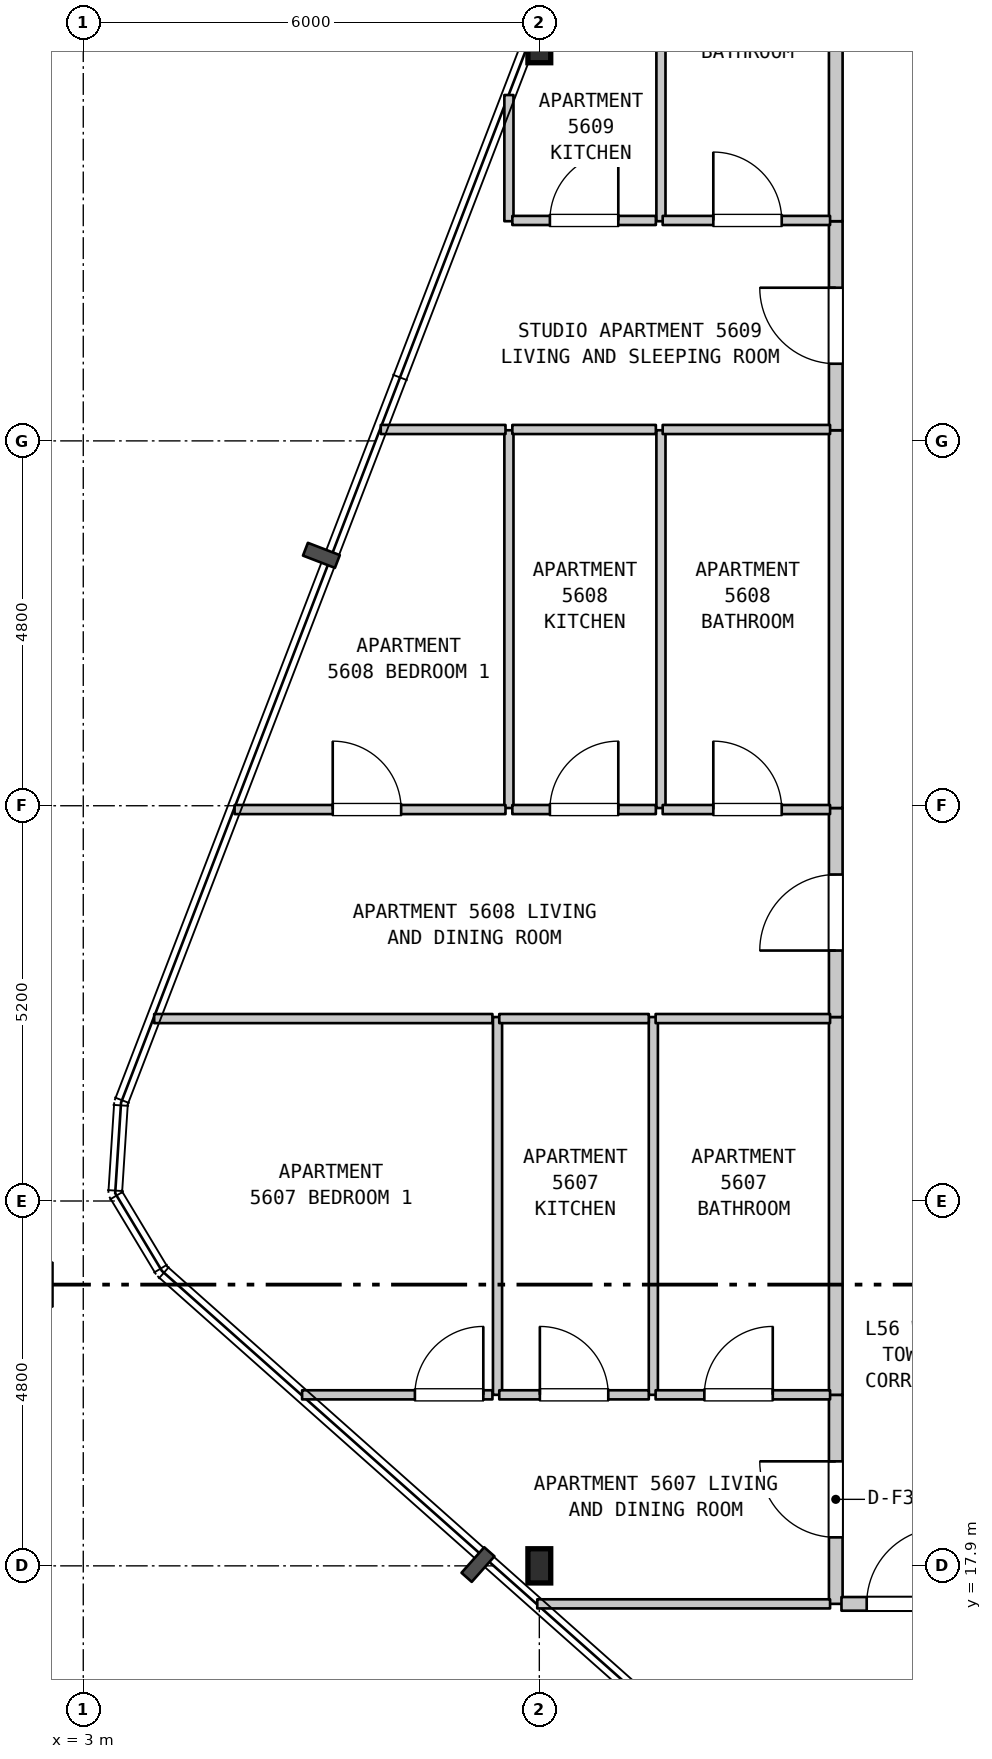
"""IFC4 building model, lengths in metres.
Left out: names, types, materials, properties, quantities, classifications, styles, units other than length and angle.
Written with IfcOpenShell. Run it as: python <this file> out.ifc"""

import sys

from ifc_helpers import new_model, si_unit, direction, frame, frame_2d, origin, origin_2d, place, context, subcontext, project, spatial, rectangle, i_section, extrude, element, fill, save


model = new_model("IFC4")
c1 = context("Model", 3, precision=1e-05, world=origin(), true_north=direction((0.0, 1.0)))
c2 = subcontext(c1, "Body", "Model", "MODEL_VIEW")
j1 = project(units=[si_unit("LENGTHUNIT", "METRE"), si_unit("PLANEANGLEUNIT", "RADIAN")], contexts=[c1])
p1 = place(None, origin())
s1 = spatial("IfcSite", under=j1, at=p1, CompositionType="ELEMENT")
p2 = place(p1, origin())
s2 = spatial("IfcBuilding", under=s1, at=p2, CompositionType="ELEMENT")
p3 = place(p2, frame((0.0, 0.0, 226.5)))
s3 = spatial("IfcBuildingStorey", under=s2, at=p3, CompositionType="ELEMENT", Elevation=226.5)
for number, where, z_axis, x_axis in (
    (1, (9.0, 17.9, 0.0), (0.0, 0.0, 1.0), (1.0, 0.0, 0.0)),
    (2, (9.0, 37.9, 0.0), (0.0, 0.0, 1.0), (1.0, 0.0, 0.0)),
):
    element("IfcColumn", number, at=place(p3, frame(where, z_axis=z_axis, x_axis=x_axis)), inside=s3, PredefinedType="COLUMN", context=c2, shape_type="SweptSolid", body=[
        extrude(i_section(OverallWidth=0.3, OverallDepth=0.45, WebThickness=0.014, FlangeThickness=0.026, FilletRadius=0.027, at=origin_2d()), origin(), (0.0, 0.0, 1.0), 3.7),
    ])
p4 = place(p3, frame((8.45, 20.15, 0.0), z_axis=(0.0, 0.0, 1.0), x_axis=(0.0, 1.0, 0.0)))
e3 = element("IfcWall", 3, at=p4, inside=s3, PredefinedType="PARTITIONING", context=c2, shape_type="SweptSolid", body=[
    extrude(rectangle(XDim=4.97, YDim=0.12, at=frame_2d((2.485, 0.0))), origin(), (0.0, 0.0, 1.0), 3.39),
])
p5 = place(p3, frame((8.6, 27.87, 0.0), z_axis=(0.0, 0.0, 1.0), x_axis=(0.0, 1.0, 0.0)))
e4 = element("IfcWall", 4, at=p5, inside=s3, PredefinedType="PARTITIONING", context=c2, shape_type="SweptSolid", body=[
    extrude(rectangle(XDim=4.97, YDim=0.12, at=frame_2d((2.485, 0.0))), origin(), (0.0, 0.0, 1.0), 3.39),
])
p6 = place(p3, frame((8.6, 35.59, 0.0), z_axis=(0.0, 0.0, 1.0), x_axis=(0.0, 1.0, 0.0)))
e5 = element("IfcWall", 5, at=p6, inside=s3, PredefinedType="PARTITIONING", context=c2, shape_type="SweptSolid", body=[
    extrude(rectangle(XDim=1.66, YDim=0.12, at=frame_2d((0.83, 0.0))), origin(), (0.0, 0.0, 1.0), 3.39),
])
p7 = place(p3, frame((10.5, 20.15, 0.0), z_axis=(0.0, 0.0, 1.0), x_axis=(0.0, 1.0, 0.0)))
e6 = element("IfcWall", 6, at=p7, inside=s3, PredefinedType="PARTITIONING", context=c2, shape_type="SweptSolid", body=[
    extrude(rectangle(XDim=4.97, YDim=0.12, at=frame_2d((2.485, 0.0))), origin(), (0.0, 0.0, 1.0), 3.39),
])
p8 = place(p3, frame((10.6, 27.87, 0.0), z_axis=(0.0, 0.0, 1.0), x_axis=(0.0, 1.0, 0.0)))
e7 = element("IfcWall", 7, at=p8, inside=s3, PredefinedType="PARTITIONING", context=c2, shape_type="SweptSolid", body=[
    extrude(rectangle(XDim=4.97, YDim=0.12, at=frame_2d((2.485, 0.0))), origin(), (0.0, 0.0, 1.0), 3.39),
])
p9 = place(p3, frame((10.6, 35.59, 0.0), z_axis=(0.0, 0.0, 1.0), x_axis=(0.0, 1.0, 0.0)))
e8 = element("IfcWall", 8, at=p9, inside=s3, PredefinedType="PARTITIONING", context=c2, shape_type="SweptSolid", body=[
    extrude(rectangle(XDim=4.51, YDim=0.12, at=frame_2d((2.255, 0.0))), origin(), (0.0, 0.0, 1.0), 3.39),
])
p10 = place(p3, frame((12.9, 17.4, 0.0), z_axis=(0.0, 0.0, 1.0), x_axis=(0.0, 1.0, 0.0)))
e9 = element("IfcWall", 9, at=p10, inside=s3, PredefinedType="STANDARD", context=c2, shape_type="SweptSolid", body=[
    extrude(rectangle(XDim=2.75, YDim=0.18, at=frame_2d((1.375, 0.0))), origin(), (0.0, 0.0, 1.0), 3.39),
])
p11 = place(p10, frame((0.875, 0.0, 0.0)))
e10 = element("IfcOpeningElement", 10, at=p11, cuts=e9, PredefinedType="OPENING", context=c2, shape_type="SweptSolid", body=[
    extrude(rectangle(XDim=1.0, YDim=2.15, at=frame_2d((0.5, 1.075))), frame((0.0, 0.1, 0.0), z_axis=(0.0, -1.0, 0.0), x_axis=(1.0, 0.0, 0.0)), (0.0, 0.0, 1.0), 0.2),
])
p12 = place(p3, frame((12.9, 20.15, 0.0), z_axis=(0.0, 0.0, 1.0), x_axis=(0.0, 1.0, 0.0)))
e11 = element("IfcWall", 11, at=p12, inside=s3, PredefinedType="STANDARD", context=c2, shape_type="SweptSolid", body=[
    extrude(rectangle(XDim=4.97, YDim=0.18, at=frame_2d((2.485, 0.0))), origin(), (0.0, 0.0, 1.0), 3.39),
])
p13 = place(p3, frame((12.9, 25.12, 0.0), z_axis=(0.0, 0.0, 1.0), x_axis=(0.0, 1.0, 0.0)))
e12 = element("IfcWall", 12, at=p13, inside=s3, PredefinedType="STANDARD", context=c2, shape_type="SweptSolid", body=[
    extrude(rectangle(XDim=2.75, YDim=0.18, at=frame_2d((1.375, 0.0))), origin(), (0.0, 0.0, 1.0), 3.39),
])
p14 = place(p13, frame((0.875, 0.0, 0.0)))
e13 = element("IfcOpeningElement", 13, at=p14, cuts=e12, PredefinedType="OPENING", context=c2, shape_type="SweptSolid", body=[
    extrude(rectangle(XDim=1.0, YDim=2.15, at=frame_2d((0.5, 1.075))), frame((0.0, 0.1, 0.0), z_axis=(0.0, -1.0, 0.0), x_axis=(1.0, 0.0, 0.0)), (0.0, 0.0, 1.0), 0.2),
])
p15 = place(p3, frame((12.9, 27.87, 0.0), z_axis=(0.0, 0.0, 1.0), x_axis=(0.0, 1.0, 0.0)))
e14 = element("IfcWall", 14, at=p15, inside=s3, PredefinedType="STANDARD", context=c2, shape_type="SweptSolid", body=[
    extrude(rectangle(XDim=4.97, YDim=0.18, at=frame_2d((2.485, 0.0))), origin(), (0.0, 0.0, 1.0), 3.39),
])
p16 = place(p3, frame((12.9, 32.84, 0.0), z_axis=(0.0, 0.0, 1.0), x_axis=(0.0, 1.0, 0.0)))
e15 = element("IfcWall", 15, at=p16, inside=s3, PredefinedType="STANDARD", context=c2, shape_type="SweptSolid", body=[
    extrude(rectangle(XDim=2.75, YDim=0.18, at=frame_2d((1.375, 0.0))), origin(), (0.0, 0.0, 1.0), 3.39),
])
p17 = place(p16, frame((0.875, 0.0, 0.0)))
e16 = element("IfcOpeningElement", 16, at=p17, cuts=e15, PredefinedType="OPENING", context=c2, shape_type="SweptSolid", body=[
    extrude(rectangle(XDim=1.0, YDim=2.15, at=frame_2d((0.5, 1.075))), frame((0.0, 0.1, 0.0), z_axis=(0.0, -1.0, 0.0), x_axis=(1.0, 0.0, 0.0)), (0.0, 0.0, 1.0), 0.2),
])
p18 = place(p3, frame((12.9, 35.59, 0.0), z_axis=(0.0, 0.0, 1.0), x_axis=(0.0, 1.0, 0.0)))
e17 = element("IfcWall", 17, at=p18, inside=s3, PredefinedType="STANDARD", context=c2, shape_type="SweptSolid", body=[
    extrude(rectangle(XDim=4.51, YDim=0.18, at=frame_2d((2.255, 0.0))), origin(), (0.0, 0.0, 1.0), 3.39),
])
p19 = place(p3, frame((8.973, 17.4, 0.0), z_axis=(0.0, 0.0, 1.0), x_axis=(1.0, 0.0, 0.0)))
e18 = element("IfcWall", 18, at=p19, inside=s3, PredefinedType="PARTITIONING", context=c2, shape_type="SweptSolid", body=[
    extrude(rectangle(XDim=3.852, YDim=0.12, at=frame_2d((1.926, 0.0))), origin(), (0.0, 0.0, 1.0), 3.39),
])
p20 = place(p3, frame((12.975, 17.4, 0.0), z_axis=(0.0, 0.0, 1.0), x_axis=(1.0, 0.0, 0.0)))
e19 = element("IfcWall", 19, at=p20, inside=s3, PredefinedType="STANDARD", context=c2, shape_type="SweptSolid", body=[
    extrude(rectangle(XDim=3.18, YDim=0.18, at=frame_2d((1.59, 0.0))), origin(), (0.0, 0.0, 1.0), 3.39),
])
p21 = place(p20, frame((0.332, 0.0, 0.0)))
e20 = element("IfcOpeningElement", 20, at=p21, cuts=e19, PredefinedType="OPENING", context=c2, shape_type="SweptSolid", body=[
    extrude(rectangle(XDim=1.0, YDim=2.15, at=frame_2d((0.5, 1.075))), frame((0.0, 0.1, 0.0), z_axis=(0.0, -1.0, 0.0), x_axis=(1.0, 0.0, 0.0)), (0.0, 0.0, 1.0), 0.2),
])
p22 = place(p3, frame((5.879, 20.15, 0.0), z_axis=(0.0, 0.0, 1.0), x_axis=(1.0, 0.0, 0.0)))
e21 = element("IfcWall", 21, at=p22, inside=s3, PredefinedType="PARTITIONING", context=c2, shape_type="SweptSolid", body=[
    extrude(rectangle(XDim=2.504, YDim=0.12, at=frame_2d((1.252, 0.0))), origin(), (0.0, 0.0, 1.0), 3.39),
])
p23 = place(p22, frame((1.484, 0.0, 0.0)))
e22 = element("IfcOpeningElement", 22, at=p23, cuts=e21, PredefinedType="OPENING", context=c2, shape_type="SweptSolid", body=[
    extrude(rectangle(XDim=0.9, YDim=2.15, at=frame_2d((0.45, 1.075))), frame((0.0, 0.07, 0.0), z_axis=(0.0, -1.0, 0.0), x_axis=(1.0, 0.0, 0.0)), (0.0, 0.0, 1.0), 0.14),
])
p24 = place(p3, frame((8.473, 20.15, 0.0), z_axis=(0.0, 0.0, 1.0), x_axis=(1.0, 0.0, 0.0)))
e23 = element("IfcWall", 23, at=p24, inside=s3, PredefinedType="PARTITIONING", context=c2, shape_type="SweptSolid", body=[
    extrude(rectangle(XDim=1.967, YDim=0.12, at=frame_2d((0.983, 0.0))), origin(), (0.0, 0.0, 1.0), 3.39),
])
p25 = place(p24, frame((0.534, 0.0, 0.0)))
e24 = element("IfcOpeningElement", 24, at=p25, cuts=e23, PredefinedType="OPENING", context=c2, shape_type="SweptSolid", body=[
    extrude(rectangle(XDim=0.9, YDim=2.15, at=frame_2d((0.45, 1.075))), frame((0.0, 0.07, 0.0), z_axis=(0.0, -1.0, 0.0), x_axis=(1.0, 0.0, 0.0)), (0.0, 0.0, 1.0), 0.14),
])
p26 = place(p3, frame((10.53, 20.15, 0.0), z_axis=(0.0, 0.0, 1.0), x_axis=(1.0, 0.0, 0.0)))
e25 = element("IfcWall", 25, at=p26, inside=s3, PredefinedType="PARTITIONING", context=c2, shape_type="SweptSolid", body=[
    extrude(rectangle(XDim=2.295, YDim=0.12, at=frame_2d((1.147, 0.0))), origin(), (0.0, 0.0, 1.0), 3.39),
])
p27 = place(p26, frame((0.641, 0.0, 0.0)))
e26 = element("IfcOpeningElement", 26, at=p27, cuts=e25, PredefinedType="OPENING", context=c2, shape_type="SweptSolid", body=[
    extrude(rectangle(XDim=0.9, YDim=2.1, at=frame_2d((0.45, 1.05))), frame((0.0, 0.07, 0.0), z_axis=(0.0, -1.0, 0.0), x_axis=(1.0, 0.0, 0.0)), (0.0, 0.0, 1.0), 0.14),
])
p28 = place(p3, frame((3.933, 25.1, 0.0), z_axis=(0.0, 0.0, 1.0), x_axis=(1.0, 0.0, 0.0)))
e27 = element("IfcWall", 27, at=p28, inside=s3, PredefinedType="PARTITIONING", context=c2, shape_type="SweptSolid", body=[
    extrude(rectangle(XDim=4.45, YDim=0.12, at=frame_2d((2.225, 0.0))), origin(), (0.0, 0.0, 1.0), 3.39),
])
p29 = place(p3, frame((8.473, 25.1, 0.0), z_axis=(0.0, 0.0, 1.0), x_axis=(1.0, 0.0, 0.0)))
e28 = element("IfcWall", 28, at=p29, inside=s3, PredefinedType="PARTITIONING", context=c2, shape_type="SweptSolid", body=[
    extrude(rectangle(XDim=1.967, YDim=0.12, at=frame_2d((0.983, 0.0))), origin(), (0.0, 0.0, 1.0), 3.39),
])
p30 = place(p3, frame((10.53, 25.1, 0.0), z_axis=(0.0, 0.0, 1.0), x_axis=(1.0, 0.0, 0.0)))
e29 = element("IfcWall", 29, at=p30, inside=s3, PredefinedType="PARTITIONING", context=c2, shape_type="SweptSolid", body=[
    extrude(rectangle(XDim=2.295, YDim=0.12, at=frame_2d((1.147, 0.0))), origin(), (0.0, 0.0, 1.0), 3.39),
])
p31 = place(p3, frame((4.991, 27.85, 0.0), z_axis=(0.0, 0.0, 1.0), x_axis=(1.0, 0.0, 0.0)))
e30 = element("IfcWall", 30, at=p31, inside=s3, PredefinedType="PARTITIONING", context=c2, shape_type="SweptSolid", body=[
    extrude(rectangle(XDim=3.564, YDim=0.12, at=frame_2d((1.782, 0.0))), origin(), (0.0, 0.0, 1.0), 3.39),
])
p32 = place(p31, frame((1.291, 0.0, 0.0)))
e31 = element("IfcOpeningElement", 31, at=p32, cuts=e30, PredefinedType="OPENING", context=c2, shape_type="SweptSolid", body=[
    extrude(rectangle(XDim=0.9, YDim=2.15, at=frame_2d((0.45, 1.075))), frame((0.0, 0.07, 0.0), z_axis=(0.0, -1.0, 0.0), x_axis=(1.0, 0.0, 0.0)), (0.0, 0.0, 1.0), 0.14),
])
p33 = place(p3, frame((8.645, 27.85, 0.0), z_axis=(0.0, 0.0, 1.0), x_axis=(1.0, 0.0, 0.0)))
e32 = element("IfcWall", 32, at=p33, inside=s3, PredefinedType="PARTITIONING", context=c2, shape_type="SweptSolid", body=[
    extrude(rectangle(XDim=1.888, YDim=0.12, at=frame_2d((0.944, 0.0))), origin(), (0.0, 0.0, 1.0), 3.39),
])
p34 = place(p33, frame((0.494, 0.0, 0.0)))
e33 = element("IfcOpeningElement", 33, at=p34, cuts=e32, PredefinedType="OPENING", context=c2, shape_type="SweptSolid", body=[
    extrude(rectangle(XDim=0.9, YDim=2.15, at=frame_2d((0.45, 1.075))), frame((0.0, 0.07, 0.0), z_axis=(0.0, -1.0, 0.0), x_axis=(1.0, 0.0, 0.0)), (0.0, 0.0, 1.0), 0.14),
])
p35 = place(p3, frame((10.623, 27.85, 0.0), z_axis=(0.0, 0.0, 1.0), x_axis=(1.0, 0.0, 0.0)))
e34 = element("IfcWall", 34, at=p35, inside=s3, PredefinedType="PARTITIONING", context=c2, shape_type="SweptSolid", body=[
    extrude(rectangle(XDim=2.202, YDim=0.12, at=frame_2d((1.101, 0.0))), origin(), (0.0, 0.0, 1.0), 3.39),
])
p36 = place(p35, frame((0.666, 0.0, 0.0)))
e35 = element("IfcOpeningElement", 35, at=p36, cuts=e34, PredefinedType="OPENING", context=c2, shape_type="SweptSolid", body=[
    extrude(rectangle(XDim=0.9, YDim=2.1, at=frame_2d((0.45, 1.05))), frame((0.0, 0.07, 0.0), z_axis=(0.0, -1.0, 0.0), x_axis=(1.0, 0.0, 0.0)), (0.0, 0.0, 1.0), 0.14),
])
p37 = place(p3, frame((6.914, 32.85, 0.0), z_axis=(0.0, 0.0, 1.0), x_axis=(1.0, 0.0, 0.0)))
e36 = element("IfcWall", 36, at=p37, inside=s3, PredefinedType="PARTITIONING", context=c2, shape_type="SweptSolid", body=[
    extrude(rectangle(XDim=1.641, YDim=0.12, at=frame_2d((0.82, 0.0))), origin(), (0.0, 0.0, 1.0), 3.39),
])
p38 = place(p3, frame((8.645, 32.85, 0.0), z_axis=(0.0, 0.0, 1.0), x_axis=(1.0, 0.0, 0.0)))
e37 = element("IfcWall", 37, at=p38, inside=s3, PredefinedType="PARTITIONING", context=c2, shape_type="SweptSolid", body=[
    extrude(rectangle(XDim=1.888, YDim=0.12, at=frame_2d((0.944, 0.0))), origin(), (0.0, 0.0, 1.0), 3.39),
])
p39 = place(p3, frame((10.623, 32.85, 0.0), z_axis=(0.0, 0.0, 1.0), x_axis=(1.0, 0.0, 0.0)))
e38 = element("IfcWall", 38, at=p39, inside=s3, PredefinedType="PARTITIONING", context=c2, shape_type="SweptSolid", body=[
    extrude(rectangle(XDim=2.202, YDim=0.12, at=frame_2d((1.101, 0.0))), origin(), (0.0, 0.0, 1.0), 3.39),
])
p40 = place(p3, frame((8.645, 35.6, 0.0), z_axis=(0.0, 0.0, 1.0), x_axis=(1.0, 0.0, 0.0)))
e39 = element("IfcWall", 39, at=p40, inside=s3, PredefinedType="PARTITIONING", context=c2, shape_type="SweptSolid", body=[
    extrude(rectangle(XDim=1.888, YDim=0.12, at=frame_2d((0.944, 0.0))), origin(), (0.0, 0.0, 1.0), 3.39),
])
p41 = place(p40, frame((0.494, 0.0, 0.0)))
e40 = element("IfcOpeningElement", 40, at=p41, cuts=e39, PredefinedType="OPENING", context=c2, shape_type="SweptSolid", body=[
    extrude(rectangle(XDim=0.9, YDim=2.15, at=frame_2d((0.45, 1.075))), frame((0.0, 0.07, 0.0), z_axis=(0.0, -1.0, 0.0), x_axis=(1.0, 0.0, 0.0)), (0.0, 0.0, 1.0), 0.14),
])
p42 = place(p3, frame((10.623, 35.6, 0.0), z_axis=(0.0, 0.0, 1.0), x_axis=(1.0, 0.0, 0.0)))
e41 = element("IfcWall", 41, at=p42, inside=s3, PredefinedType="PARTITIONING", context=c2, shape_type="SweptSolid", body=[
    extrude(rectangle(XDim=2.202, YDim=0.12, at=frame_2d((1.101, 0.0))), origin(), (0.0, 0.0, 1.0), 3.39),
])
p43 = place(p42, frame((0.666, 0.0, 0.0)))
e42 = element("IfcOpeningElement", 42, at=p43, cuts=e41, PredefinedType="OPENING", context=c2, shape_type="SweptSolid", body=[
    extrude(rectangle(XDim=0.9, YDim=2.1, at=frame_2d((0.45, 1.05))), frame((0.0, 0.07, 0.0), z_axis=(0.0, -1.0, 0.0), x_axis=(1.0, 0.0, 0.0)), (0.0, 0.0, 1.0), 0.14),
])
p44 = place(p11, origin())
e43 = element("IfcDoor", 43, at=p44, inside=s3, OperationType="SINGLE_SWING_RIGHT", PredefinedType="DOOR", context=c2, shape_type="SweptSolid", body=[
    extrude(rectangle(XDim=1.0, YDim=2.15, at=frame_2d((0.5, 1.075))), frame((0.0, 0.025, 0.0), z_axis=(0.0, -1.0, 0.0), x_axis=(1.0, 0.0, 0.0)), (0.0, 0.0, 1.0), 0.05),
])
fill(e10, e43)
p45 = place(p14, origin())
e44 = element("IfcDoor", 44, at=p45, inside=s3, OperationType="SINGLE_SWING_LEFT", PredefinedType="DOOR", context=c2, shape_type="SweptSolid", body=[
    extrude(rectangle(XDim=1.0, YDim=2.15, at=frame_2d((0.5, 1.075))), frame((0.0, 0.025, 0.0), z_axis=(0.0, -1.0, 0.0), x_axis=(1.0, 0.0, 0.0)), (0.0, 0.0, 1.0), 0.05),
])
fill(e13, e44)
p46 = place(p17, origin())
e45 = element("IfcDoor", 45, at=p46, inside=s3, OperationType="SINGLE_SWING_RIGHT", PredefinedType="DOOR", context=c2, shape_type="SweptSolid", body=[
    extrude(rectangle(XDim=1.0, YDim=2.15, at=frame_2d((0.5, 1.075))), frame((0.0, 0.025, 0.0), z_axis=(0.0, -1.0, 0.0), x_axis=(1.0, 0.0, 0.0)), (0.0, 0.0, 1.0), 0.05),
])
fill(e16, e45)
p47 = place(p21, origin())
e46 = element("IfcDoor", 46, at=p47, inside=s3, OperationType="SINGLE_SWING_RIGHT", PredefinedType="DOOR", context=c2, shape_type="SweptSolid", body=[
    extrude(rectangle(XDim=1.0, YDim=2.15, at=frame_2d((0.5, 1.075))), frame((0.0, 0.025, 0.0), z_axis=(0.0, -1.0, 0.0), x_axis=(1.0, 0.0, 0.0)), (0.0, 0.0, 1.0), 0.05),
])
fill(e20, e46)
p48 = place(p23, origin())
e47 = element("IfcDoor", 47, at=p48, inside=s3, OperationType="SINGLE_SWING_RIGHT", PredefinedType="DOOR", context=c2, shape_type="SweptSolid", body=[
    extrude(rectangle(XDim=0.9, YDim=2.15, at=frame_2d((0.45, 1.075))), frame((0.0, 0.025, 0.0), z_axis=(0.0, -1.0, 0.0), x_axis=(1.0, 0.0, 0.0)), (0.0, 0.0, 1.0), 0.05),
])
fill(e22, e47)
p49 = place(p25, origin())
e48 = element("IfcDoor", 48, at=p49, inside=s3, OperationType="SINGLE_SWING_LEFT", PredefinedType="DOOR", context=c2, shape_type="SweptSolid", body=[
    extrude(rectangle(XDim=0.9, YDim=2.15, at=frame_2d((0.45, 1.075))), frame((0.0, 0.025, 0.0), z_axis=(0.0, -1.0, 0.0), x_axis=(1.0, 0.0, 0.0)), (0.0, 0.0, 1.0), 0.05),
])
fill(e24, e48)
p50 = place(p27, origin())
e49 = element("IfcDoor", 49, at=p50, inside=s3, OperationType="SINGLE_SWING_RIGHT", PredefinedType="DOOR", context=c2, shape_type="SweptSolid", body=[
    extrude(rectangle(XDim=0.9, YDim=2.1, at=frame_2d((0.45, 1.05))), frame((0.0, 0.025, 0.0), z_axis=(0.0, -1.0, 0.0), x_axis=(1.0, 0.0, 0.0)), (0.0, 0.0, 1.0), 0.05),
])
fill(e26, e49)
p51 = place(p32, origin())
e50 = element("IfcDoor", 50, at=p51, inside=s3, OperationType="SINGLE_SWING_LEFT", PredefinedType="DOOR", context=c2, shape_type="SweptSolid", body=[
    extrude(rectangle(XDim=0.9, YDim=2.15, at=frame_2d((0.45, 1.075))), frame((0.0, 0.025, 0.0), z_axis=(0.0, -1.0, 0.0), x_axis=(1.0, 0.0, 0.0)), (0.0, 0.0, 1.0), 0.05),
])
fill(e31, e50)
p52 = place(p34, origin())
e51 = element("IfcDoor", 51, at=p52, inside=s3, OperationType="SINGLE_SWING_RIGHT", PredefinedType="DOOR", context=c2, shape_type="SweptSolid", body=[
    extrude(rectangle(XDim=0.9, YDim=2.15, at=frame_2d((0.45, 1.075))), frame((0.0, 0.025, 0.0), z_axis=(0.0, -1.0, 0.0), x_axis=(1.0, 0.0, 0.0)), (0.0, 0.0, 1.0), 0.05),
])
fill(e33, e51)
p53 = place(p36, origin())
e52 = element("IfcDoor", 52, at=p53, inside=s3, OperationType="SINGLE_SWING_LEFT", PredefinedType="DOOR", context=c2, shape_type="SweptSolid", body=[
    extrude(rectangle(XDim=0.9, YDim=2.1, at=frame_2d((0.45, 1.05))), frame((0.0, 0.025, 0.0), z_axis=(0.0, -1.0, 0.0), x_axis=(1.0, 0.0, 0.0)), (0.0, 0.0, 1.0), 0.05),
])
fill(e35, e52)
p54 = place(p41, origin())
e53 = element("IfcDoor", 53, at=p54, inside=s3, OperationType="SINGLE_SWING_RIGHT", PredefinedType="DOOR", context=c2, shape_type="SweptSolid", body=[
    extrude(rectangle(XDim=0.9, YDim=2.15, at=frame_2d((0.45, 1.075))), frame((0.0, 0.025, 0.0), z_axis=(0.0, -1.0, 0.0), x_axis=(1.0, 0.0, 0.0)), (0.0, 0.0, 1.0), 0.05),
])
fill(e40, e53)
p55 = place(p43, origin())
e54 = element("IfcDoor", 54, at=p55, inside=s3, OperationType="SINGLE_SWING_LEFT", PredefinedType="DOOR", context=c2, shape_type="SweptSolid", body=[
    extrude(rectangle(XDim=0.9, YDim=2.1, at=frame_2d((0.45, 1.05))), frame((0.0, 0.025, 0.0), z_axis=(0.0, -1.0, 0.0), x_axis=(1.0, 0.0, 0.0)), (0.0, 0.0, 1.0), 0.05),
])
fill(e42, e54)
save(model, sys.argv[1])
